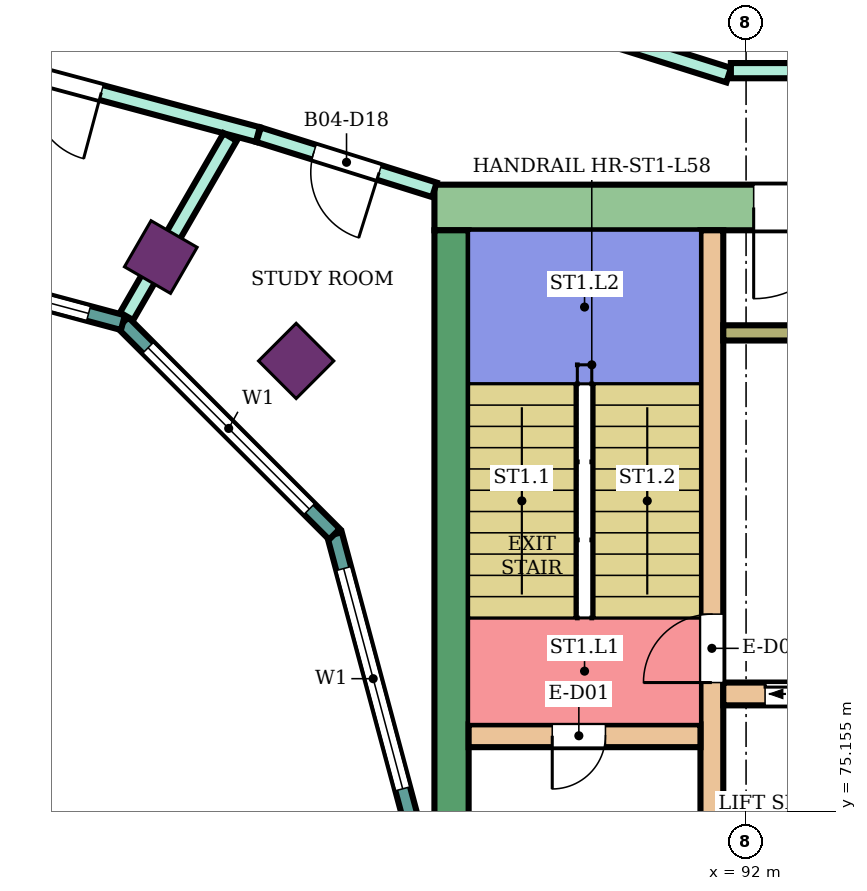
"""IFC4 building model, lengths in metres.
Left out: names, types, materials, properties, quantities, classifications, styles, units other than length and angle.
Written with IfcOpenShell. Run it as: python <this file> out.ifc"""

import sys

from ifc_helpers import new_model, si_unit, direction, frame, frame_2d, origin, origin_2d, place, context, subcontext, project, spatial, rectangle, extrude, element, fill, save


model = new_model("IFC4")
c1 = context("Model", 3, precision=1e-05, world=origin(), true_north=direction((0.0, 1.0)))
c2 = subcontext(c1, "Body", "Model", "MODEL_VIEW")
j1 = project(units=[si_unit("LENGTHUNIT", "METRE"), si_unit("PLANEANGLEUNIT", "RADIAN")], contexts=[c1])
p1 = place(None, origin())
s1 = spatial("IfcSite", under=j1, at=p1, CompositionType="ELEMENT")
p2 = place(p1, origin())
s2 = spatial("IfcBuilding", under=s1, at=p2, CompositionType="ELEMENT")
p3 = place(p2, frame((0.0, 0.0, 254.1)))
s3 = spatial("IfcBuildingStorey", under=s2, at=p3, CompositionType="ELEMENT", Elevation=254.1)
for number, where, z_axis, x_axis in (
    (1, (86.081, 81.081, 0.0), (0.0, 0.0, 1.0), (0.707, 0.707, 0.0)),
    (2, (84.3, 82.448, 0.0), (0.0, 0.0, 1.0), (0.5, 0.866, 0.0)),
):
    element("IfcColumn", number, at=place(p3, frame(where, z_axis=z_axis, x_axis=x_axis)), inside=s3, PredefinedType="COLUMN", context=c2, shape_type="SweptSolid", body=[
        extrude(rectangle(XDim=0.7, YDim=0.7, at=origin_2d()), origin(), (0.0, 0.0, 1.0), 4.2),
    ])
p4 = place(p3, frame((87.9, 83.1, 0.0), z_axis=(0.0, 0.0, 1.0), x_axis=(1.0, 0.0, 0.0)))
e3 = element("IfcWall", 3, at=p4, inside=s3, PredefinedType="SHEAR", context=c2, shape_type="SweptSolid", body=[
    extrude(rectangle(XDim=14.9, YDim=0.6, at=frame_2d((7.45, 0.0))), origin(), (0.0, 0.0, 1.0), 3.88),
])
p5 = place(p4, frame((4.2, 0.0, 0.0)))
e4 = element("IfcOpeningElement", 4, at=p5, cuts=e3, PredefinedType="OPENING", context=c2, shape_type="SweptSolid", body=[
    extrude(rectangle(XDim=2.4, YDim=2.4, at=frame_2d((1.2, 1.2))), frame((0.0, 0.31, 0.0), z_axis=(0.0, -1.0, 0.0), x_axis=(1.0, 0.0, 0.0)), (0.0, 0.0, 1.0), 0.62),
])
p6 = place(p3, frame((88.125, 75.0, 0.0), z_axis=(0.0, 0.0, 1.0), x_axis=(0.0, 1.0, 0.0)))
e5 = element("IfcWall", 5, at=p6, inside=s3, PredefinedType="SHEAR", context=c2, shape_type="SweptSolid", body=[
    extrude(rectangle(XDim=7.8, YDim=0.45, at=frame_2d((3.9, 0.0))), origin(), (0.0, 0.0, 1.0), 3.88),
])
p7 = place(p3, frame((91.55, 75.0, 0.0), z_axis=(0.0, 0.0, 1.0), x_axis=(0.0, 1.0, 0.0)))
e6 = element("IfcWall", 6, at=p7, inside=s3, PredefinedType="SHEAR", context=c2, shape_type="SweptSolid", body=[
    extrude(rectangle(XDim=7.8, YDim=0.3, at=frame_2d((3.9, 0.0))), origin(), (0.0, 0.0, 1.0), 3.88),
])
p8 = place(p7, frame((1.85, 0.0, 0.0)))
e7 = element("IfcOpeningElement", 7, at=p8, cuts=e6, PredefinedType="OPENING", context=c2, shape_type="SweptSolid", body=[
    extrude(rectangle(XDim=0.9, YDim=2.1, at=frame_2d((0.45, 1.05))), frame((0.0, 0.16, 0.0), z_axis=(0.0, -1.0, 0.0), x_axis=(1.0, 0.0, 0.0)), (0.0, 0.0, 1.0), 0.32),
])
p9 = place(p3, frame((88.35, 76.15, 0.0), z_axis=(0.0, 0.0, 1.0), x_axis=(1.0, 0.0, 0.0)))
e8 = element("IfcWall", 8, at=p9, inside=s3, PredefinedType="SHEAR", context=c2, shape_type="SweptSolid", body=[
    extrude(rectangle(XDim=3.05, YDim=0.3, at=frame_2d((1.525, 0.0))), origin(), (0.0, 0.0, 1.0), 3.88),
])
p10 = place(p9, frame((1.1, 0.0, 0.0)))
e9 = element("IfcOpeningElement", 9, at=p10, cuts=e8, PredefinedType="OPENING", context=c2, shape_type="SweptSolid", body=[
    extrude(rectangle(XDim=0.7, YDim=2.0, at=frame_2d((0.35, 1.0))), frame((0.0, 0.16, 0.0), z_axis=(0.0, -1.0, 0.0), x_axis=(1.0, 0.0, 0.0)), (0.0, 0.0, 1.0), 0.32),
])
p11 = place(p3, frame((91.7, 76.7, 0.0), z_axis=(0.0, 0.0, 1.0), x_axis=(1.0, 0.0, 0.0)))
e10 = element("IfcWall", 10, at=p11, inside=s3, PredefinedType="SHEAR", context=c2, shape_type="SweptSolid", body=[
    extrude(rectangle(XDim=11.1, YDim=0.3, at=frame_2d((5.55, 0.0))), origin(), (0.0, 0.0, 1.0), 3.88),
])
p12 = place(p11, frame((0.55, 0.0, 0.0)))
e11 = element("IfcOpeningElement", 11, at=p12, cuts=e10, PredefinedType="OPENING", context=c2, shape_type="SweptSolid", body=[
    extrude(rectangle(XDim=1.1, YDim=2.1, at=frame_2d((0.55, 1.05))), frame((0.0, 0.16, 0.0), z_axis=(0.0, -1.0, 0.0), x_axis=(1.0, 0.0, 0.0)), (0.0, 0.0, 1.0), 0.32),
])
p13 = place(p11, frame((3.0, 0.0, 0.0)))
e12 = element("IfcOpeningElement", 12, at=p13, cuts=e10, PredefinedType="OPENING", context=c2, shape_type="SweptSolid", body=[
    extrude(rectangle(XDim=1.2, YDim=2.1, at=frame_2d((0.6, 1.05))), frame((0.0, 0.16, 0.0), z_axis=(0.0, -1.0, 0.0), x_axis=(1.0, 0.0, 0.0)), (0.0, 0.0, 1.0), 0.32),
])
p14 = place(p11, frame((5.5, 0.0, 0.0)))
e13 = element("IfcOpeningElement", 13, at=p14, cuts=e10, PredefinedType="OPENING", context=c2, shape_type="SweptSolid", body=[
    extrude(rectangle(XDim=1.2, YDim=2.1, at=frame_2d((0.6, 1.05))), frame((0.0, 0.16, 0.0), z_axis=(0.0, -1.0, 0.0), x_axis=(1.0, 0.0, 0.0)), (0.0, 0.0, 1.0), 0.32),
])
p15 = place(p11, frame((7.77, 0.0, 0.0)))
e14 = element("IfcOpeningElement", 14, at=p15, cuts=e10, PredefinedType="OPENING", context=c2, shape_type="SweptSolid", body=[
    extrude(rectangle(XDim=0.9, YDim=2.1, at=frame_2d((0.45, 1.05))), frame((0.0, 0.16, 0.0), z_axis=(0.0, -1.0, 0.0), x_axis=(1.0, 0.0, 0.0)), (0.0, 0.0, 1.0), 0.32),
])
p16 = place(p11, frame((9.57, 0.0, 0.0)))
e15 = element("IfcOpeningElement", 15, at=p16, cuts=e10, PredefinedType="OPENING", context=c2, shape_type="SweptSolid", body=[
    extrude(rectangle(XDim=0.9, YDim=2.1, at=frame_2d((0.45, 1.05))), frame((0.0, 0.16, 0.0), z_axis=(0.0, -1.0, 0.0), x_axis=(1.0, 0.0, 0.0)), (0.0, 0.0, 1.0), 0.32),
])
p17 = place(p3, frame((91.7, 81.45, 0.0), z_axis=(0.0, 0.0, 1.0), x_axis=(1.0, 0.0, 0.0)))
e16 = element("IfcWall", 16, at=p17, inside=s3, PredefinedType="SHEAR", context=c2, shape_type="SweptSolid", body=[
    extrude(rectangle(XDim=4.35, YDim=0.2, at=frame_2d((2.175, 0.0))), origin(), (0.0, 0.0, 1.0), 3.88),
])
p18 = place(p3, frame((87.604, 75.0, 0.0), z_axis=(0.0, 0.0, 1.0), x_axis=(-0.258789828301, 0.965933654434, 0.0)))
e17 = element("IfcWall", 17, at=p18, inside=s3, PredefinedType="NOTDEFINED", context=c2, shape_type="SweptSolid", body=[
    extrude(rectangle(XDim=3.936, YDim=0.2, at=frame_2d((1.968, 0.0))), origin(), (0.0, 0.0, 1.0), 4.2),
])
p19 = place(p18, frame((0.468, 0.0, 0.9)))
e18 = element("IfcOpeningElement", 18, at=p19, cuts=e17, PredefinedType="OPENING", context=c2, shape_type="SweptSolid", body=[
    extrude(rectangle(XDim=3.0, YDim=2.3, at=frame_2d((1.5, 1.15))), frame((0.0, 0.11, 0.0), z_axis=(0.0, -1.0, 0.0), x_axis=(1.0, 0.0, 0.0)), (0.0, 0.0, 1.0), 0.22),
])
p20 = place(p3, frame((86.585, 78.802, 0.0), z_axis=(0.0, 0.0, 1.0), x_axis=(-0.707106781187, 0.707106781187, 0.0)))
e19 = element("IfcWall", 19, at=p20, inside=s3, PredefinedType="NOTDEFINED", context=c2, shape_type="SweptSolid", body=[
    extrude(rectangle(XDim=3.936, YDim=0.2, at=frame_2d((1.968, 0.0))), origin(), (0.0, 0.0, 1.0), 4.2),
])
p21 = place(p20, frame((0.468, 0.0, 0.9)))
e20 = element("IfcOpeningElement", 20, at=p21, cuts=e19, PredefinedType="OPENING", context=c2, shape_type="SweptSolid", body=[
    extrude(rectangle(XDim=3.0, YDim=2.3, at=frame_2d((1.5, 1.15))), frame((0.0, 0.11, 0.0), z_axis=(0.0, -1.0, 0.0), x_axis=(1.0, 0.0, 0.0)), (0.0, 0.0, 1.0), 0.22),
])
p22 = place(p3, frame((83.802, 81.585, 0.0), z_axis=(0.0, 0.0, 1.0), x_axis=(-0.965933654434, 0.258789828301, 0.0)))
e21 = element("IfcWall", 21, at=p22, inside=s3, PredefinedType="NOTDEFINED", context=c2, shape_type="SweptSolid", body=[
    extrude(rectangle(XDim=3.936, YDim=0.2, at=frame_2d((1.968, 0.0))), origin(), (0.0, 0.0, 1.0), 4.2),
])
p23 = place(p22, frame((0.468, 0.0, 0.9)))
e22 = element("IfcOpeningElement", 22, at=p23, cuts=e21, PredefinedType="OPENING", context=c2, shape_type="SweptSolid", body=[
    extrude(rectangle(XDim=3.0, YDim=2.3, at=frame_2d((1.5, 1.15))), frame((0.0, 0.11, 0.0), z_axis=(0.0, -1.0, 0.0), x_axis=(1.0, 0.0, 0.0)), (0.0, 0.0, 1.0), 0.22),
])
p24 = place(p3, frame((80.0, 85.554, 0.0), z_axis=(0.0, 0.0, 1.0), x_axis=(0.965894438951, -0.258936155845, 0.0)))
e23 = element("IfcWall", 23, at=p24, inside=s3, PredefinedType="PARTITIONING", context=c2, shape_type="SweptSolid", body=[
    extrude(rectangle(XDim=5.774, YDim=0.2, at=frame_2d((2.887, 0.0))), origin(), (0.0, 0.0, 1.0), 3.75),
])
p25 = place(p24, frame((1.841, 0.0, 0.0)))
e24 = element("IfcOpeningElement", 24, at=p25, cuts=e23, PredefinedType="OPENING", context=c2, shape_type="SweptSolid", body=[
    extrude(rectangle(XDim=1.8, YDim=2.1, at=frame_2d((0.9, 1.05))), frame((0.0, 0.11, 0.0), z_axis=(0.0, -1.0, 0.0), x_axis=(1.0, 0.0, 0.0)), (0.0, 0.0, 1.0), 0.22),
])
p26 = place(p3, frame((83.85, 81.668, 0.0), z_axis=(0.0, 0.0, 1.0), x_axis=(0.500099931433, 0.865967700657, 0.0)))
e25 = element("IfcWall", 25, at=p26, inside=s3, PredefinedType="PARTITIONING", context=c2, shape_type="SweptSolid", body=[
    extrude(rectangle(XDim=2.725, YDim=0.2, at=frame_2d((1.362, 0.0))), origin(), (0.0, 0.0, 1.0), 3.75),
])
p27 = place(p3, frame((85.587, 84.057, 0.0), z_axis=(0.0, 0.0, 1.0), x_axis=(0.954239513179, -0.299043393987, 0.0)))
e26 = element("IfcWall", 26, at=p27, inside=s3, PredefinedType="PARTITIONING", context=c2, shape_type="SweptSolid", body=[
    extrude(rectangle(XDim=2.424, YDim=0.2, at=frame_2d((1.212, 0.0))), origin(), (0.0, 0.0, 1.0), 3.75),
])
p28 = place(p27, frame((0.762, 0.0, 0.0)))
e27 = element("IfcOpeningElement", 27, at=p28, cuts=e26, PredefinedType="OPENING", context=c2, shape_type="SweptSolid", body=[
    extrude(rectangle(XDim=0.9, YDim=2.1, at=frame_2d((0.45, 1.05))), frame((0.0, 0.11, 0.0), z_axis=(0.0, -1.0, 0.0), x_axis=(1.0, 0.0, 0.0)), (0.0, 0.0, 1.0), 0.22),
])
p29 = place(p3, frame((86.313, 86.554, 0.0), z_axis=(0.0, 0.0, 1.0), x_axis=(0.954077387881, -0.29956024091, 0.0)))
e28 = element("IfcWall", 28, at=p29, inside=s3, PredefinedType="PARTITIONING", context=c2, shape_type="SweptSolid", body=[
    extrude(rectangle(XDim=5.72, YDim=0.2, at=frame_2d((2.86, 0.0))), origin(), (0.0, 0.0, 1.0), 3.75),
])
p30 = place(p3, frame((91.8, 84.9, 0.0), z_axis=(0.0, 0.0, 1.0), x_axis=(1.0, 0.0, 0.0)))
e29 = element("IfcWall", 29, at=p30, inside=s3, PredefinedType="PARTITIONING", context=c2, shape_type="SweptSolid", body=[
    extrude(rectangle(XDim=3.0, YDim=0.2, at=frame_2d((1.5, 0.0))), origin(), (0.0, 0.0, 1.0), 3.75),
])
p31 = place(p30, frame((1.45, 0.0, 0.0)))
e30 = element("IfcOpeningElement", 30, at=p31, cuts=e29, PredefinedType="OPENING", context=c2, shape_type="SweptSolid", body=[
    extrude(rectangle(XDim=1.0, YDim=2.1, at=frame_2d((0.5, 1.05))), frame((0.0, 0.11, 0.0), z_axis=(0.0, -1.0, 0.0), x_axis=(1.0, 0.0, 0.0)), (0.0, 0.0, 1.0), 0.22),
])
p32 = place(p19, origin())
e31 = element("IfcWindow", 31, at=p32, inside=s3, PartitioningType="SINGLE_PANEL", PredefinedType="WINDOW", context=c2, shape_type="SweptSolid", body=[
    extrude(rectangle(XDim=3.0, YDim=2.3, at=frame_2d((1.5, 1.15))), frame((0.0, 0.03, 0.0), z_axis=(0.0, -1.0, 0.0), x_axis=(1.0, 0.0, 0.0)), (0.0, 0.0, 1.0), 0.06),
])
fill(e18, e31)
p33 = place(p21, origin())
e32 = element("IfcWindow", 32, at=p33, inside=s3, PartitioningType="SINGLE_PANEL", PredefinedType="WINDOW", context=c2, shape_type="SweptSolid", body=[
    extrude(rectangle(XDim=3.0, YDim=2.3, at=frame_2d((1.5, 1.15))), frame((0.0, 0.03, 0.0), z_axis=(0.0, -1.0, 0.0), x_axis=(1.0, 0.0, 0.0)), (0.0, 0.0, 1.0), 0.06),
])
fill(e20, e32)
p34 = place(p23, origin())
e33 = element("IfcWindow", 33, at=p34, inside=s3, PartitioningType="SINGLE_PANEL", PredefinedType="WINDOW", context=c2, shape_type="SweptSolid", body=[
    extrude(rectangle(XDim=3.0, YDim=2.3, at=frame_2d((1.5, 1.15))), frame((0.0, 0.03, 0.0), z_axis=(0.0, -1.0, 0.0), x_axis=(1.0, 0.0, 0.0)), (0.0, 0.0, 1.0), 0.06),
])
fill(e22, e33)
p35 = place(p28, frame((0.9, 0.0, 0.0), z_axis=(0.0, 0.0, 1.0), x_axis=(-1.0, 0.0, 0.0)))
e34 = element("IfcDoor", 34, at=p35, inside=s3, OperationType="SINGLE_SWING_LEFT", PredefinedType="DOOR", context=c2, shape_type="SweptSolid", body=[
    extrude(rectangle(XDim=0.9, YDim=2.1, at=frame_2d((0.45, 1.05))), frame((0.0, 0.025, 0.0), z_axis=(0.0, -1.0, 0.0), x_axis=(1.0, 0.0, 0.0)), (0.0, 0.0, 1.0), 0.05),
])
fill(e27, e34)
p36 = place(p25, frame((1.8, 0.0, 0.0), z_axis=(0.0, 0.0, 1.0), x_axis=(-1.0, 0.0, 0.0)))
e35 = element("IfcDoor", 35, at=p36, inside=s3, OperationType="DOUBLE_DOOR_SINGLE_SWING", PredefinedType="DOOR", context=c2, shape_type="SweptSolid", body=[
    extrude(rectangle(XDim=1.8, YDim=2.1, at=frame_2d((0.9, 1.05))), frame((0.0, 0.025, 0.0), z_axis=(0.0, -1.0, 0.0), x_axis=(1.0, 0.0, 0.0)), (0.0, 0.0, 1.0), 0.05),
])
fill(e24, e35)
p37 = place(p10, frame((0.7, 0.0, 0.0), z_axis=(0.0, 0.0, 1.0), x_axis=(-1.0, 0.0, 0.0)))
e36 = element("IfcDoor", 36, at=p37, inside=s3, OperationType="SINGLE_SWING_RIGHT", PredefinedType="DOOR", context=c2, shape_type="SweptSolid", body=[
    extrude(rectangle(XDim=0.7, YDim=2.0, at=frame_2d((0.35, 1.0))), frame((0.0, 0.025, 0.0), z_axis=(0.0, -1.0, 0.0), x_axis=(1.0, 0.0, 0.0)), (0.0, 0.0, 1.0), 0.05),
])
fill(e9, e36)
p38 = place(p8, origin())
e37 = element("IfcDoor", 37, at=p38, inside=s3, OperationType="SINGLE_SWING_LEFT", PredefinedType="DOOR", context=c2, shape_type="SweptSolid", body=[
    extrude(rectangle(XDim=0.9, YDim=2.1, at=frame_2d((0.45, 1.05))), frame((0.0, 0.025, 0.0), z_axis=(0.0, -1.0, 0.0), x_axis=(1.0, 0.0, 0.0)), (0.0, 0.0, 1.0), 0.05),
])
fill(e7, e37)
p39 = place(p12, origin())
e38 = element("IfcDoor", 38, at=p39, inside=s3, OperationType="DOUBLE_DOOR_SLIDING", PredefinedType="DOOR", context=c2, shape_type="SweptSolid", body=[
    extrude(rectangle(XDim=1.1, YDim=2.1, at=frame_2d((0.55, 1.05))), frame((0.0, 0.025, 0.0), z_axis=(0.0, -1.0, 0.0), x_axis=(1.0, 0.0, 0.0)), (0.0, 0.0, 1.0), 0.05),
])
fill(e11, e38)
p40 = place(p5, frame((2.4, 0.0, 0.0), z_axis=(0.0, 0.0, 1.0), x_axis=(-1.0, 0.0, 0.0)))
e39 = element("IfcDoor", 39, at=p40, inside=s3, OperationType="DOUBLE_DOOR_SINGLE_SWING", PredefinedType="DOOR", context=c2, shape_type="SweptSolid", body=[
    extrude(rectangle(XDim=2.4, YDim=2.4, at=frame_2d((1.2, 1.2))), frame((0.0, 0.025, 0.0), z_axis=(0.0, -1.0, 0.0), x_axis=(1.0, 0.0, 0.0)), (0.0, 0.0, 1.0), 0.05),
])
fill(e4, e39)
save(model, sys.argv[1])
